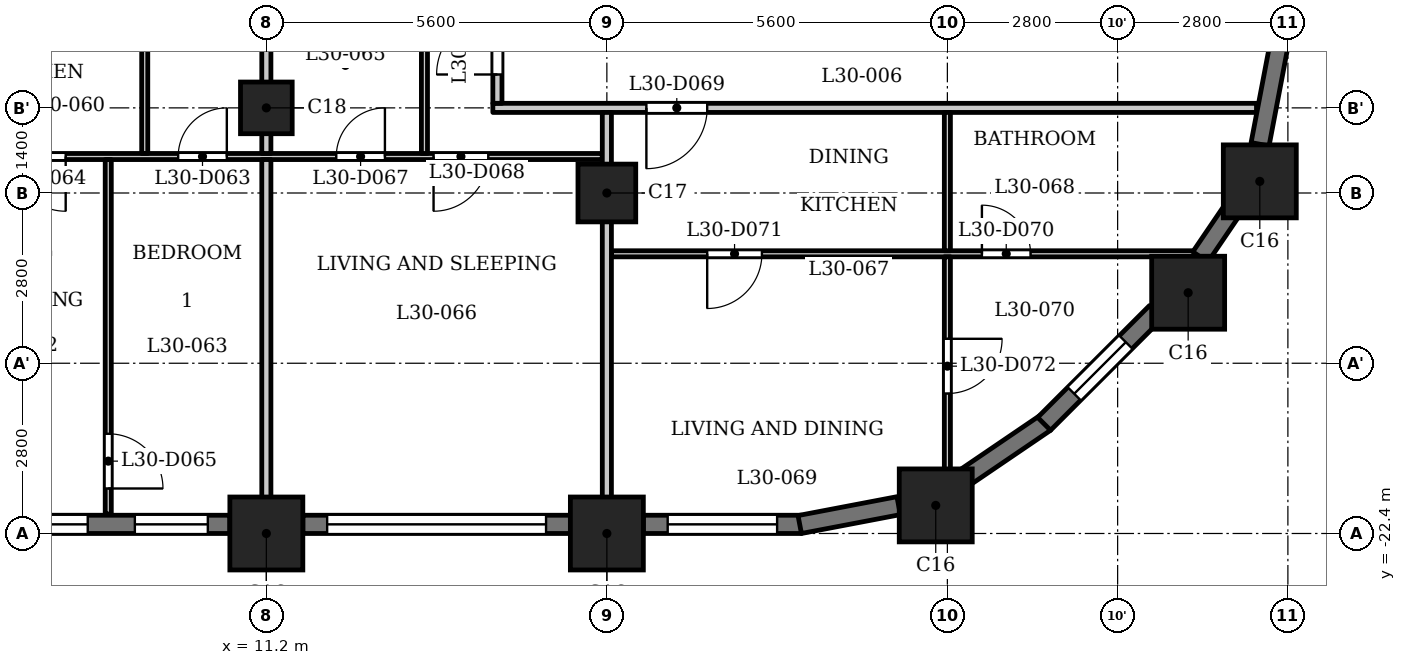
"""IFC4 building model, lengths in metres.
Left out: names, types, materials, properties, quantities, classifications, styles, units other than length and angle.
Written with IfcOpenShell. Run it as: python <this file> out.ifc"""

import sys

from ifc_helpers import new_model, si_unit, direction, frame, frame_2d, origin, origin_2d, place, context, subcontext, project, spatial, rectangle, extrude, element, fill, save


model = new_model("IFC4")
c1 = context("Model", 3, precision=1e-05, world=origin(), true_north=direction((0.0, 1.0)))
c2 = subcontext(c1, "Body", "Model", "MODEL_VIEW")
j1 = project(units=[si_unit("LENGTHUNIT", "METRE"), si_unit("PLANEANGLEUNIT", "RADIAN")], contexts=[c1])
p1 = place(None, origin())
s1 = spatial("IfcSite", under=j1, at=p1, CompositionType="ELEMENT")
p2 = place(p1, origin())
s2 = spatial("IfcBuilding", under=s1, at=p2, CompositionType="ELEMENT")
p3 = place(p2, frame((0.0, 0.0, 118.3)))
s3 = spatial("IfcBuildingStorey", under=s2, at=p3, CompositionType="ELEMENT", Elevation=118.3)
for number, where, z_axis, x_axis in (
    (1, (11.2, -22.4, 0.0), (0.0, 0.0, 1.0), (1.0, 0.0, 0.0)),
    (2, (16.8, -22.4, 0.0), (0.0, 0.0, 1.0), (1.0, 0.0, 0.0)),
    (3, (22.209, -21.938, 0.0), (0.0, 0.0, 1.0), (1.0, 0.0, 0.0)),
    (4, (26.36, -18.44, 0.0), (0.0, 0.0, 1.0), (1.0, 0.0, 0.0)),
    (5, (27.538, -16.609, 0.0), (0.0, 0.0, 1.0), (1.0, 0.0, 0.0)),
):
    element("IfcColumn", number, at=place(p3, frame(where, z_axis=z_axis, x_axis=x_axis)), inside=s3, PredefinedType="COLUMN", context=c2, shape_type="SweptSolid", body=[
        extrude(rectangle(XDim=1.2, YDim=1.2, at=origin_2d()), origin(), (0.0, 0.0, 1.0), 3.5),
    ])
p4 = place(p3, frame((16.8, -16.8, 0.0), z_axis=(0.0, 0.0, 1.0), x_axis=(1.0, 0.0, 0.0)))
e6 = element("IfcColumn", 6, at=p4, inside=s3, PredefinedType="COLUMN", context=c2, shape_type="SweptSolid", body=[
    extrude(rectangle(XDim=0.95, YDim=0.95, at=origin_2d()), origin(), (0.0, 0.0, 1.0), 3.5),
])
p5 = place(p3, frame((11.2, -15.4, 0.0), z_axis=(0.0, 0.0, 1.0), x_axis=(1.0, 0.0, 0.0)))
e7 = element("IfcColumn", 7, at=p5, inside=s3, PredefinedType="COLUMN", context=c2, shape_type="SweptSolid", body=[
    extrude(rectangle(XDim=0.85, YDim=0.85, at=origin_2d()), origin(), (0.0, 0.0, 1.0), 3.5),
])
p6 = place(p3, frame((6.2, -22.25, 0.0), z_axis=(0.0, 0.0, 1.0), x_axis=(1.0, 0.0, 0.0)))
e8 = element("IfcWall", 8, at=p6, inside=s3, PredefinedType="SOLIDWALL", context=c2, shape_type="SweptSolid", body=[
    extrude(rectangle(XDim=4.4, YDim=0.3, at=frame_2d((2.2, 0.0))), origin(), (0.0, 0.0, 1.0), 2.4),
])
p7 = place(p6, frame((0.262, 0.0, 0.9)))
e9 = element("IfcOpeningElement", 9, at=p7, cuts=e8, PredefinedType="OPENING", context=c2, shape_type="SweptSolid", body=[
    extrude(rectangle(XDim=1.8, YDim=1.25, at=frame_2d((0.9, 0.625))), frame((0.0, 0.16, 0.0), z_axis=(0.0, -1.0, 0.0), x_axis=(1.0, 0.0, 0.0)), (0.0, 0.0, 1.0), 0.32),
])
p8 = place(p6, frame((2.837, 0.0, 0.6)))
e10 = element("IfcOpeningElement", 10, at=p8, cuts=e8, PredefinedType="OPENING", context=c2, shape_type="SweptSolid", body=[
    extrude(rectangle(XDim=1.2, YDim=1.55, at=frame_2d((0.6, 0.775))), frame((0.0, 0.16, 0.0), z_axis=(0.0, -1.0, 0.0), x_axis=(1.0, 0.0, 0.0)), (0.0, 0.0, 1.0), 0.32),
])
p9 = place(p3, frame((11.8, -22.25, 0.0), z_axis=(0.0, 0.0, 1.0), x_axis=(1.0, 0.0, 0.0)))
e11 = element("IfcWall", 11, at=p9, inside=s3, PredefinedType="SOLIDWALL", context=c2, shape_type="SweptSolid", body=[
    extrude(rectangle(XDim=4.4, YDim=0.3, at=frame_2d((2.2, 0.0))), origin(), (0.0, 0.0, 1.0), 2.4),
])
p10 = place(p9, frame((0.4, 0.0, 1.2)))
e12 = element("IfcOpeningElement", 12, at=p10, cuts=e11, PredefinedType="OPENING", context=c2, shape_type="SweptSolid", body=[
    extrude(rectangle(XDim=3.6, YDim=0.95, at=frame_2d((1.8, 0.475))), frame((0.0, 0.16, 0.0), z_axis=(0.0, -1.0, 0.0), x_axis=(1.0, 0.0, 0.0)), (0.0, 0.0, 1.0), 0.32),
])
p11 = place(p3, frame((17.4, -22.25, 0.0), z_axis=(0.0, 0.0, 1.0), x_axis=(1.0, 0.0, 0.0)))
e13 = element("IfcWall", 13, at=p11, inside=s3, PredefinedType="SOLIDWALL", context=c2, shape_type="SweptSolid", body=[
    extrude(rectangle(XDim=2.6, YDim=0.3, at=frame_2d((1.3, 0.0))), origin(), (0.0, 0.0, 1.0), 2.4),
])
p12 = place(p11, frame((0.4, 0.0, 0.9)))
e14 = element("IfcOpeningElement", 14, at=p12, cuts=e13, PredefinedType="OPENING", context=c2, shape_type="SweptSolid", body=[
    extrude(rectangle(XDim=1.8, YDim=1.25, at=frame_2d((0.9, 0.625))), frame((0.0, 0.16, 0.0), z_axis=(0.0, -1.0, 0.0), x_axis=(1.0, 0.0, 0.0)), (0.0, 0.0, 1.0), 0.32),
])
for number, where, z_axis, x_axis in (
    (15, (19.972, -22.253, 0.0), (0.0, 0.0, 1.0), (0.982, 0.187, 0.0)),
    (16, (22.643, -21.51, 0.0), (0.0, 0.0, 1.0), (0.827, 0.562, 0.0)),
):
    element("IfcWall", number, at=place(p3, frame(where, z_axis=z_axis, x_axis=x_axis)), inside=s3, PredefinedType="SOLIDWALL", context=c2, shape_type="SweptSolid", body=[
        extrude(rectangle(XDim=1.656, YDim=0.3, at=frame_2d((0.828, 0.0))), origin(), (0.0, 0.0, 1.0), 2.4),
    ])
p13 = place(p3, frame((23.991, -20.597, 0.0), z_axis=(0.0, 0.0, 1.0), x_axis=(0.707106781187, 0.707106781187, 0.0)))
e17 = element("IfcWall", 17, at=p13, inside=s3, PredefinedType="SOLIDWALL", context=c2, shape_type="SweptSolid", body=[
    extrude(rectangle(XDim=2.6, YDim=0.3, at=frame_2d((1.3, 0.0))), origin(), (0.0, 0.0, 1.0), 2.4),
])
p14 = place(p13, frame((0.7, 0.0, 0.6)))
e18 = element("IfcOpeningElement", 18, at=p14, cuts=e17, PredefinedType="OPENING", context=c2, shape_type="SweptSolid", body=[
    extrude(rectangle(XDim=1.2, YDim=1.55, at=frame_2d((0.6, 0.775))), frame((0.0, 0.16, 0.0), z_axis=(0.0, -1.0, 0.0), x_axis=(1.0, 0.0, 0.0)), (0.0, 0.0, 1.0), 0.32),
])
p15 = place(p3, frame((26.561, -17.851, 0.0), z_axis=(0.0, 0.0, 1.0), x_axis=(0.562173331661, 0.827019434577, 0.0)))
e19 = element("IfcWall", 19, at=p15, inside=s3, PredefinedType="SOLIDWALL", context=c2, shape_type="SweptSolid", body=[
    extrude(rectangle(XDim=0.977, YDim=0.3, at=frame_2d((0.489, 0.0))), origin(), (0.0, 0.0, 1.0), 3.2),
])
p16 = place(p3, frame((27.542, -15.999, 0.0), z_axis=(0.0, 0.0, 1.0), x_axis=(0.187349172861, 0.982293381546, 0.0)))
e20 = element("IfcWall", 20, at=p16, inside=s3, PredefinedType="SOLIDWALL", context=c2, shape_type="SweptSolid", body=[
    extrude(rectangle(XDim=1.656, YDim=0.3, at=frame_2d((0.828, 0.0))), origin(), (0.0, 0.0, 1.0), 2.4),
])
p17 = place(p3, frame((16.875, -17.8, 0.0), z_axis=(0.0, 0.0, 1.0), x_axis=(1.0, 0.0, 0.0)))
e21 = element("IfcWall", 21, at=p17, inside=s3, PredefinedType="PARTITIONING", context=c2, shape_type="SweptSolid", body=[
    extrude(rectangle(XDim=9.59, YDim=0.1, at=frame_2d((4.795, 0.0))), origin(), (0.0, 0.0, 1.0), 3.2),
])
p18 = place(p17, frame((6.093, 0.0, 0.0)))
e22 = element("IfcOpeningElement", 22, at=p18, cuts=e21, PredefinedType="OPENING", context=c2, shape_type="SweptSolid", body=[
    extrude(rectangle(XDim=0.8, YDim=2.1, at=frame_2d((0.4, 1.05))), frame((0.0, 0.06, 0.0), z_axis=(0.0, -1.0, 0.0), x_axis=(1.0, 0.0, 0.0)), (0.0, 0.0, 1.0), 0.12),
])
p19 = place(p17, frame((1.575, 0.0, 0.0)))
e23 = element("IfcOpeningElement", 23, at=p19, cuts=e21, PredefinedType="OPENING", context=c2, shape_type="SweptSolid", body=[
    extrude(rectangle(XDim=0.9, YDim=2.1, at=frame_2d((0.45, 1.05))), frame((0.0, 0.06, 0.0), z_axis=(0.0, -1.0, 0.0), x_axis=(1.0, 0.0, 0.0)), (0.0, 0.0, 1.0), 0.12),
])
p20 = place(p3, frame((-16.725, -16.2, 0.0), z_axis=(0.0, 0.0, 1.0), x_axis=(1.0, 0.0, 0.0)))
e24 = element("IfcWall", 24, at=p20, inside=s3, PredefinedType="PARTITIONING", context=c2, shape_type="SweptSolid", body=[
    extrude(rectangle(XDim=33.45, YDim=0.1, at=frame_2d((16.725, 0.0))), origin(), (0.0, 0.0, 1.0), 3.2),
])
p21 = place(p20, frame((4.075, 0.0, 0.0)))
e25 = element("IfcOpeningElement", 25, at=p21, cuts=e24, PredefinedType="OPENING", context=c2, shape_type="SweptSolid", body=[
    extrude(rectangle(XDim=0.8, YDim=2.1, at=frame_2d((0.4, 1.05))), frame((0.0, 0.06, 0.0), z_axis=(0.0, -1.0, 0.0), x_axis=(1.0, 0.0, 0.0)), (0.0, 0.0, 1.0), 0.12),
])
p22 = place(p20, frame((9.425, 0.0, 0.0)))
e26 = element("IfcOpeningElement", 26, at=p22, cuts=e24, PredefinedType="OPENING", context=c2, shape_type="SweptSolid", body=[
    extrude(rectangle(XDim=0.9, YDim=2.1, at=frame_2d((0.45, 1.05))), frame((0.0, 0.06, 0.0), z_axis=(0.0, -1.0, 0.0), x_axis=(1.0, 0.0, 0.0)), (0.0, 0.0, 1.0), 0.12),
])
p23 = place(p20, frame((19.875, 0.0, 0.0)))
e27 = element("IfcOpeningElement", 27, at=p23, cuts=e24, PredefinedType="OPENING", context=c2, shape_type="SweptSolid", body=[
    extrude(rectangle(XDim=0.8, YDim=2.1, at=frame_2d((0.4, 1.05))), frame((0.0, 0.06, 0.0), z_axis=(0.0, -1.0, 0.0), x_axis=(1.0, 0.0, 0.0)), (0.0, 0.0, 1.0), 0.12),
])
p24 = place(p20, frame((17.375, 0.0, 0.0)))
e28 = element("IfcOpeningElement", 28, at=p24, cuts=e24, PredefinedType="OPENING", context=c2, shape_type="SweptSolid", body=[
    extrude(rectangle(XDim=0.9, YDim=2.1, at=frame_2d((0.45, 1.05))), frame((0.0, 0.06, 0.0), z_axis=(0.0, -1.0, 0.0), x_axis=(1.0, 0.0, 0.0)), (0.0, 0.0, 1.0), 0.12),
])
p25 = place(p20, frame((12.525, 0.0, 0.0)))
e29 = element("IfcOpeningElement", 29, at=p25, cuts=e24, PredefinedType="OPENING", context=c2, shape_type="SweptSolid", body=[
    extrude(rectangle(XDim=0.9, YDim=2.1, at=frame_2d((0.45, 1.05))), frame((0.0, 0.06, 0.0), z_axis=(0.0, -1.0, 0.0), x_axis=(1.0, 0.0, 0.0)), (0.0, 0.0, 1.0), 0.12),
])
p26 = place(p20, frame((14.775, 0.0, 0.0)))
e30 = element("IfcOpeningElement", 30, at=p26, cuts=e24, PredefinedType="OPENING", context=c2, shape_type="SweptSolid", body=[
    extrude(rectangle(XDim=0.9, YDim=2.1, at=frame_2d((0.45, 1.05))), frame((0.0, 0.06, 0.0), z_axis=(0.0, -1.0, 0.0), x_axis=(1.0, 0.0, 0.0)), (0.0, 0.0, 1.0), 0.12),
])
p27 = place(p20, frame((26.475, 0.0, 0.0)))
e31 = element("IfcOpeningElement", 31, at=p27, cuts=e24, PredefinedType="OPENING", context=c2, shape_type="SweptSolid", body=[
    extrude(rectangle(XDim=0.8, YDim=2.1, at=frame_2d((0.4, 1.05))), frame((0.0, 0.06, 0.0), z_axis=(0.0, -1.0, 0.0), x_axis=(1.0, 0.0, 0.0)), (0.0, 0.0, 1.0), 0.12),
])
p28 = place(p20, frame((23.725, 0.0, 0.0)))
e32 = element("IfcOpeningElement", 32, at=p28, cuts=e24, PredefinedType="OPENING", context=c2, shape_type="SweptSolid", body=[
    extrude(rectangle(XDim=0.9, YDim=2.1, at=frame_2d((0.45, 1.05))), frame((0.0, 0.06, 0.0), z_axis=(0.0, -1.0, 0.0), x_axis=(1.0, 0.0, 0.0)), (0.0, 0.0, 1.0), 0.12),
])
p29 = place(p20, frame((29.075, 0.0, 0.0)))
e33 = element("IfcOpeningElement", 33, at=p29, cuts=e24, PredefinedType="OPENING", context=c2, shape_type="SweptSolid", body=[
    extrude(rectangle(XDim=0.8, YDim=2.1, at=frame_2d((0.4, 1.05))), frame((0.0, 0.06, 0.0), z_axis=(0.0, -1.0, 0.0), x_axis=(1.0, 0.0, 0.0)), (0.0, 0.0, 1.0), 0.12),
])
p30 = place(p20, frame((30.675, 0.0, 0.0)))
e34 = element("IfcOpeningElement", 34, at=p30, cuts=e24, PredefinedType="OPENING", context=c2, shape_type="SweptSolid", body=[
    extrude(rectangle(XDim=0.9, YDim=2.1, at=frame_2d((0.45, 1.05))), frame((0.0, 0.06, 0.0), z_axis=(0.0, -1.0, 0.0), x_axis=(1.0, 0.0, 0.0)), (0.0, 0.0, 1.0), 0.12),
])
p31 = place(p3, frame((14.925, -15.4, 0.0), z_axis=(0.0, 0.0, 1.0), x_axis=(1.0, 0.0, 0.0)))
e35 = element("IfcWall", 35, at=p31, inside=s3, PredefinedType="PARTITIONING", context=c2, shape_type="SweptSolid", body=[
    extrude(rectangle(XDim=12.559, YDim=0.15, at=frame_2d((6.279, 0.0))), origin(), (0.0, 0.0, 1.0), 3.2),
])
p32 = place(p31, frame((2.525, 0.0, 0.0)))
e36 = element("IfcOpeningElement", 36, at=p32, cuts=e35, PredefinedType="OPENING", context=c2, shape_type="SweptSolid", body=[
    extrude(rectangle(XDim=1.0, YDim=2.1, at=frame_2d((0.5, 1.05))), frame((0.0, 0.085, 0.0), z_axis=(0.0, -1.0, 0.0), x_axis=(1.0, 0.0, 0.0)), (0.0, 0.0, 1.0), 0.17),
])
p33 = place(p3, frame((8.6, -22.08, 0.0), z_axis=(0.0, 0.0, 1.0), x_axis=(0.0, 1.0, 0.0)))
e37 = element("IfcWall", 37, at=p33, inside=s3, PredefinedType="PARTITIONING", context=c2, shape_type="SweptSolid", body=[
    extrude(rectangle(XDim=5.83, YDim=0.1, at=frame_2d((2.915, 0.0))), origin(), (0.0, 0.0, 1.0), 3.2),
])
p34 = place(p33, frame((0.42, 0.0, 0.0)))
e38 = element("IfcOpeningElement", 38, at=p34, cuts=e37, PredefinedType="OPENING", context=c2, shape_type="SweptSolid", body=[
    extrude(rectangle(XDim=0.9, YDim=2.1, at=frame_2d((0.45, 1.05))), frame((0.0, 0.06, 0.0), z_axis=(0.0, -1.0, 0.0), x_axis=(1.0, 0.0, 0.0)), (0.0, 0.0, 1.0), 0.12),
])
p35 = place(p3, frame((9.2, -16.15, 0.0), z_axis=(0.0, 0.0, 1.0), x_axis=(0.0, 1.0, 0.0)))
e39 = element("IfcWall", 39, at=p35, inside=s3, PredefinedType="PARTITIONING", context=c2, shape_type="SweptSolid", body=[
    extrude(rectangle(XDim=2.875, YDim=0.1, at=frame_2d((1.438, 0.0))), origin(), (0.0, 0.0, 1.0), 3.2),
])
p36 = place(p3, frame((11.2, -22.98, 0.0), z_axis=(0.0, 0.0, 1.0), x_axis=(0.0, 1.0, 0.0)))
e40 = element("IfcWall", 40, at=p36, inside=s3, PredefinedType="PARTITIONING", context=c2, shape_type="SweptSolid", body=[
    extrude(rectangle(XDim=6.73, YDim=0.15, at=frame_2d((3.365, 0.0))), origin(), (0.0, 0.0, 1.0), 3.2),
])
p37 = place(p3, frame((11.2, -16.15, 0.0), z_axis=(0.0, 0.0, 1.0), x_axis=(0.0, 1.0, 0.0)))
e41 = element("IfcWall", 41, at=p37, inside=s3, PredefinedType="PARTITIONING", context=c2, shape_type="SweptSolid", body=[
    extrude(rectangle(XDim=2.875, YDim=0.15, at=frame_2d((1.438, 0.0))), origin(), (0.0, 0.0, 1.0), 3.2),
])
p38 = place(p3, frame((13.8, -16.15, 0.0), z_axis=(0.0, 0.0, 1.0), x_axis=(0.0, 1.0, 0.0)))
e42 = element("IfcWall", 42, at=p38, inside=s3, PredefinedType="PARTITIONING", context=c2, shape_type="SweptSolid", body=[
    extrude(rectangle(XDim=2.875, YDim=0.1, at=frame_2d((1.438, 0.0))), origin(), (0.0, 0.0, 1.0), 3.2),
])
p39 = place(p3, frame((15.0, -15.325, 0.0), z_axis=(0.0, 0.0, 1.0), x_axis=(0.0, 1.0, 0.0)))
e43 = element("IfcWall", 43, at=p39, inside=s3, PredefinedType="PARTITIONING", context=c2, shape_type="SweptSolid", body=[
    extrude(rectangle(XDim=2.05, YDim=0.15, at=frame_2d((1.025, 0.0))), origin(), (0.0, 0.0, 1.0), 3.2),
])
p40 = place(p39, frame((0.474, 0.0, 0.0)))
e44 = element("IfcOpeningElement", 44, at=p40, cuts=e43, PredefinedType="OPENING", context=c2, shape_type="SweptSolid", body=[
    extrude(rectangle(XDim=1.0, YDim=2.1, at=frame_2d((0.5, 1.05))), frame((0.0, 0.085, 0.0), z_axis=(0.0, -1.0, 0.0), x_axis=(1.0, 0.0, 0.0)), (0.0, 0.0, 1.0), 0.17),
])
p41 = place(p3, frame((16.8, -22.98, 0.0), z_axis=(0.0, 0.0, 1.0), x_axis=(0.0, 1.0, 0.0)))
e45 = element("IfcWall", 45, at=p41, inside=s3, PredefinedType="PARTITIONING", context=c2, shape_type="SweptSolid", body=[
    extrude(rectangle(XDim=7.505, YDim=0.15, at=frame_2d((3.752, 0.0))), origin(), (0.0, 0.0, 1.0), 3.2),
])
p42 = place(p3, frame((22.4, -21.72, 0.0), z_axis=(0.0, 0.0, 1.0), x_axis=(0.0, 1.0, 0.0)))
e46 = element("IfcWall", 46, at=p42, inside=s3, PredefinedType="PARTITIONING", context=c2, shape_type="SweptSolid", body=[
    extrude(rectangle(XDim=3.87, YDim=0.1, at=frame_2d((1.935, 0.0))), origin(), (0.0, 0.0, 1.0), 3.2),
])
p43 = place(p42, frame((1.622, 0.0, 0.0)))
e47 = element("IfcOpeningElement", 47, at=p43, cuts=e46, PredefinedType="OPENING", context=c2, shape_type="SweptSolid", body=[
    extrude(rectangle(XDim=0.9, YDim=2.1, at=frame_2d((0.45, 1.05))), frame((0.0, 0.06, 0.0), z_axis=(0.0, -1.0, 0.0), x_axis=(1.0, 0.0, 0.0)), (0.0, 0.0, 1.0), 0.12),
])
p44 = place(p3, frame((22.4, -17.75, 0.0), z_axis=(0.0, 0.0, 1.0), x_axis=(0.0, 1.0, 0.0)))
e48 = element("IfcWall", 48, at=p44, inside=s3, PredefinedType="PARTITIONING", context=c2, shape_type="SweptSolid", body=[
    extrude(rectangle(XDim=2.275, YDim=0.1, at=frame_2d((1.137, 0.0))), origin(), (0.0, 0.0, 1.0), 3.2),
])
p45 = place(p27, origin())
e49 = element("IfcDoor", 49, at=p45, inside=s3, OperationType="SINGLE_SWING_LEFT", PredefinedType="DOOR", context=c2, shape_type="SweptSolid", body=[
    extrude(rectangle(XDim=0.8, YDim=2.1, at=frame_2d((0.4, 1.05))), frame((0.0, 0.025, 0.0), z_axis=(0.0, -1.0, 0.0), x_axis=(1.0, 0.0, 0.0)), (0.0, 0.0, 1.0), 0.05),
])
fill(e31, e49)
p46 = place(p28, origin())
e50 = element("IfcDoor", 50, at=p46, inside=s3, OperationType="SINGLE_SWING_RIGHT", PredefinedType="DOOR", context=c2, shape_type="SweptSolid", body=[
    extrude(rectangle(XDim=0.9, YDim=2.1, at=frame_2d((0.45, 1.05))), frame((0.0, 0.025, 0.0), z_axis=(0.0, -1.0, 0.0), x_axis=(1.0, 0.0, 0.0)), (0.0, 0.0, 1.0), 0.05),
])
fill(e32, e50)
p47 = place(p34, origin())
e51 = element("IfcDoor", 51, at=p47, inside=s3, OperationType="SINGLE_SWING_LEFT", PredefinedType="DOOR", context=c2, shape_type="SweptSolid", body=[
    extrude(rectangle(XDim=0.9, YDim=2.1, at=frame_2d((0.45, 1.05))), frame((0.0, 0.025, 0.0), z_axis=(0.0, -1.0, 0.0), x_axis=(1.0, 0.0, 0.0)), (0.0, 0.0, 1.0), 0.05),
])
fill(e38, e51)
p48 = place(p40, origin())
e52 = element("IfcDoor", 52, at=p48, inside=s3, OperationType="SINGLE_SWING_RIGHT", PredefinedType="DOOR", context=c2, shape_type="SweptSolid", body=[
    extrude(rectangle(XDim=1.0, YDim=2.1, at=frame_2d((0.5, 1.05))), frame((0.0, 0.025, 0.0), z_axis=(0.0, -1.0, 0.0), x_axis=(1.0, 0.0, 0.0)), (0.0, 0.0, 1.0), 0.05),
])
fill(e44, e52)
p49 = place(p29, origin())
e53 = element("IfcDoor", 53, at=p49, inside=s3, OperationType="SINGLE_SWING_LEFT", PredefinedType="DOOR", context=c2, shape_type="SweptSolid", body=[
    extrude(rectangle(XDim=0.8, YDim=2.1, at=frame_2d((0.4, 1.05))), frame((0.0, 0.025, 0.0), z_axis=(0.0, -1.0, 0.0), x_axis=(1.0, 0.0, 0.0)), (0.0, 0.0, 1.0), 0.05),
])
fill(e33, e53)
p50 = place(p30, origin())
e54 = element("IfcDoor", 54, at=p50, inside=s3, OperationType="SINGLE_SWING_LEFT", PredefinedType="DOOR", context=c2, shape_type="SweptSolid", body=[
    extrude(rectangle(XDim=0.9, YDim=2.1, at=frame_2d((0.45, 1.05))), frame((0.0, 0.025, 0.0), z_axis=(0.0, -1.0, 0.0), x_axis=(1.0, 0.0, 0.0)), (0.0, 0.0, 1.0), 0.05),
])
fill(e34, e54)
p51 = place(p32, origin())
e55 = element("IfcDoor", 55, at=p51, inside=s3, OperationType="SINGLE_SWING_LEFT", PredefinedType="DOOR", context=c2, shape_type="SweptSolid", body=[
    extrude(rectangle(XDim=1.0, YDim=2.1, at=frame_2d((0.5, 1.05))), frame((0.0, 0.025, 0.0), z_axis=(0.0, -1.0, 0.0), x_axis=(1.0, 0.0, 0.0)), (0.0, 0.0, 1.0), 0.05),
])
fill(e36, e55)
p52 = place(p18, origin())
e56 = element("IfcDoor", 56, at=p52, inside=s3, OperationType="SINGLE_SWING_RIGHT", PredefinedType="DOOR", context=c2, shape_type="SweptSolid", body=[
    extrude(rectangle(XDim=0.8, YDim=2.1, at=frame_2d((0.4, 1.05))), frame((0.0, 0.025, 0.0), z_axis=(0.0, -1.0, 0.0), x_axis=(1.0, 0.0, 0.0)), (0.0, 0.0, 1.0), 0.05),
])
fill(e22, e56)
p53 = place(p19, origin())
e57 = element("IfcDoor", 57, at=p53, inside=s3, OperationType="SINGLE_SWING_LEFT", PredefinedType="DOOR", context=c2, shape_type="SweptSolid", body=[
    extrude(rectangle(XDim=0.9, YDim=2.1, at=frame_2d((0.45, 1.05))), frame((0.0, 0.025, 0.0), z_axis=(0.0, -1.0, 0.0), x_axis=(1.0, 0.0, 0.0)), (0.0, 0.0, 1.0), 0.05),
])
fill(e23, e57)
p54 = place(p43, origin())
e58 = element("IfcDoor", 58, at=p54, inside=s3, OperationType="SINGLE_SWING_RIGHT", PredefinedType="DOOR", context=c2, shape_type="SweptSolid", body=[
    extrude(rectangle(XDim=0.9, YDim=2.1, at=frame_2d((0.45, 1.05))), frame((0.0, 0.025, 0.0), z_axis=(0.0, -1.0, 0.0), x_axis=(1.0, 0.0, 0.0)), (0.0, 0.0, 1.0), 0.05),
])
fill(e47, e58)
p55 = place(p7, origin())
e59 = element("IfcWindow", 59, at=p55, inside=s3, PartitioningType="SINGLE_PANEL", PredefinedType="WINDOW", context=c2, shape_type="SweptSolid", body=[
    extrude(rectangle(XDim=1.8, YDim=1.25, at=frame_2d((0.9, 0.625))), frame((0.0, 0.03, 0.0), z_axis=(0.0, -1.0, 0.0), x_axis=(1.0, 0.0, 0.0)), (0.0, 0.0, 1.0), 0.06),
])
fill(e9, e59)
p56 = place(p8, origin())
e60 = element("IfcWindow", 60, at=p56, inside=s3, PartitioningType="SINGLE_PANEL", PredefinedType="WINDOW", context=c2, shape_type="SweptSolid", body=[
    extrude(rectangle(XDim=1.2, YDim=1.55, at=frame_2d((0.6, 0.775))), frame((0.0, 0.03, 0.0), z_axis=(0.0, -1.0, 0.0), x_axis=(1.0, 0.0, 0.0)), (0.0, 0.0, 1.0), 0.06),
])
fill(e10, e60)
p57 = place(p10, origin())
e61 = element("IfcWindow", 61, at=p57, inside=s3, PartitioningType="SINGLE_PANEL", PredefinedType="WINDOW", context=c2, shape_type="SweptSolid", body=[
    extrude(rectangle(XDim=3.6, YDim=0.95, at=frame_2d((1.8, 0.475))), frame((0.0, 0.03, 0.0), z_axis=(0.0, -1.0, 0.0), x_axis=(1.0, 0.0, 0.0)), (0.0, 0.0, 1.0), 0.06),
])
fill(e12, e61)
p58 = place(p12, origin())
e62 = element("IfcWindow", 62, at=p58, inside=s3, PartitioningType="SINGLE_PANEL", PredefinedType="WINDOW", context=c2, shape_type="SweptSolid", body=[
    extrude(rectangle(XDim=1.8, YDim=1.25, at=frame_2d((0.9, 0.625))), frame((0.0, 0.03, 0.0), z_axis=(0.0, -1.0, 0.0), x_axis=(1.0, 0.0, 0.0)), (0.0, 0.0, 1.0), 0.06),
])
fill(e14, e62)
p59 = place(p14, origin())
e63 = element("IfcWindow", 63, at=p59, inside=s3, PartitioningType="SINGLE_PANEL", PredefinedType="WINDOW", context=c2, shape_type="SweptSolid", body=[
    extrude(rectangle(XDim=1.2, YDim=1.55, at=frame_2d((0.6, 0.775))), frame((0.0, 0.03, 0.0), z_axis=(0.0, -1.0, 0.0), x_axis=(1.0, 0.0, 0.0)), (0.0, 0.0, 1.0), 0.06),
])
fill(e18, e63)
save(model, sys.argv[1])
